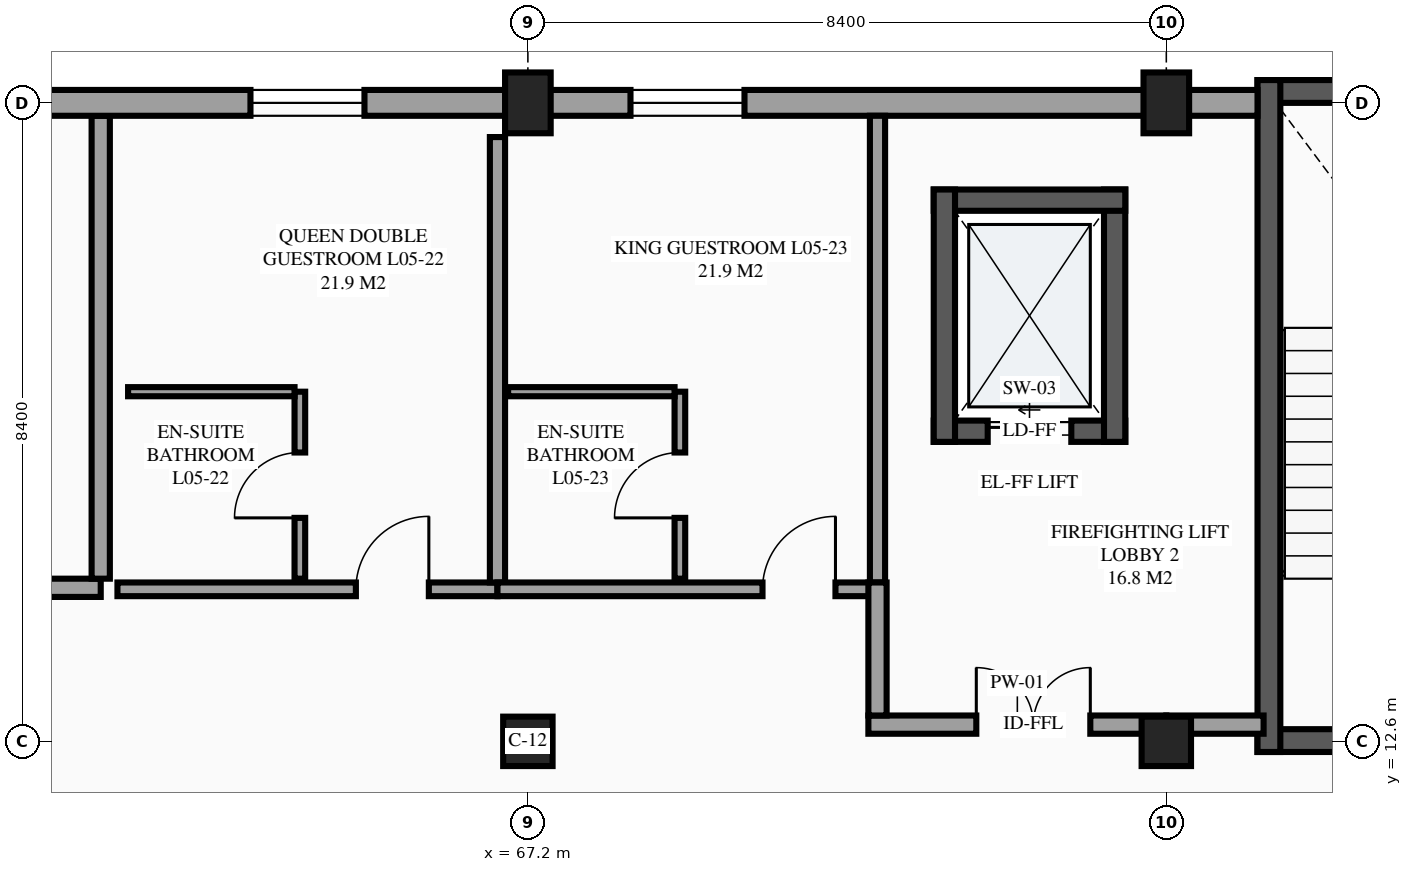
"""IFC4 building model, lengths in metres.
Left out: names, types, materials, properties, quantities, classifications, styles, units other than length and angle.
Written with IfcOpenShell. Run it as: python <this file> out.ifc"""

import sys

from ifc_helpers import new_model, si_unit, direction, frame, frame_2d, origin, origin_2d, place, context, subcontext, project, spatial, rectangle, extrude, element, fill, save


model = new_model("IFC4")
c1 = context("Model", 3, precision=1e-05, world=origin(), true_north=direction((0.0, 1.0)))
c2 = subcontext(c1, "Body", "Model", "MODEL_VIEW")
j1 = project(units=[si_unit("LENGTHUNIT", "METRE"), si_unit("PLANEANGLEUNIT", "RADIAN")], contexts=[c1])
p1 = place(None, origin())
s1 = spatial("IfcSite", under=j1, at=p1, CompositionType="ELEMENT")
p2 = place(p1, origin())
s2 = spatial("IfcBuilding", under=s1, at=p2, CompositionType="ELEMENT")
p3 = place(p2, frame((0.0, 0.0, 21.9)))
s3 = spatial("IfcBuildingStorey", under=s2, at=p3, CompositionType="ELEMENT", Elevation=21.9)
p4 = place(p3, frame((67.2, 12.6, 0.0), z_axis=(0.0, 0.0, 1.0), x_axis=(1.0, 0.0, 0.0)))
e1 = element("IfcColumn", 1, at=p4, inside=s3, PredefinedType="COLUMN", context=c2, shape_type="SweptSolid", body=[
    extrude(rectangle(XDim=0.65, YDim=0.65, at=origin_2d()), origin(), (0.0, 0.0, 1.0), 3.6),
])
p5 = place(p3, frame((67.2, 21.0, 0.0), z_axis=(0.0, 0.0, 1.0), x_axis=(1.0, 0.0, 0.0)))
e2 = element("IfcColumn", 2, at=p5, inside=s3, PredefinedType="COLUMN", context=c2, shape_type="SweptSolid", body=[
    extrude(rectangle(XDim=0.6, YDim=0.8, at=origin_2d()), origin(), (0.0, 0.0, 1.0), 3.6),
])
p6 = place(p3, frame((75.6, 12.6, 0.0), z_axis=(0.0, 0.0, 1.0), x_axis=(1.0, 0.0, 0.0)))
e3 = element("IfcColumn", 3, at=p6, inside=s3, PredefinedType="COLUMN", context=c2, shape_type="SweptSolid", body=[
    extrude(rectangle(XDim=0.65, YDim=0.65, at=origin_2d()), origin(), (0.0, 0.0, 1.0), 3.6),
])
p7 = place(p3, frame((75.6, 21.0, 0.0), z_axis=(0.0, 0.0, 1.0), x_axis=(1.0, 0.0, 0.0)))
e4 = element("IfcColumn", 4, at=p7, inside=s3, PredefinedType="COLUMN", context=c2, shape_type="SweptSolid", body=[
    extrude(rectangle(XDim=0.6, YDim=0.8, at=origin_2d()), origin(), (0.0, 0.0, 1.0), 3.6),
])
p8 = place(p3, frame((75.6, 21.0, 0.0), z_axis=(0.0, 0.0, 1.0), x_axis=(-1.0, 0.0, 0.0)))
e5 = element("IfcWall", 5, at=p8, inside=s3, PredefinedType="STANDARD", context=c2, shape_type="SweptSolid", body=[
    extrude(rectangle(XDim=8.4, YDim=0.34, at=frame_2d((4.2, 0.0))), origin(), (0.0, 0.0, 1.0), 2.68),
])
p9 = place(p8, frame((5.55, 0.0, 0.85)))
e6 = element("IfcOpeningElement", 6, at=p9, cuts=e5, PredefinedType="OPENING", context=c2, shape_type="SweptSolid", body=[
    extrude(rectangle(XDim=1.5, YDim=1.5, at=frame_2d((0.75, 0.75))), frame((0.0, 0.18, 0.0), z_axis=(0.0, -1.0, 0.0), x_axis=(1.0, 0.0, 0.0)), (0.0, 0.0, 1.0), 0.36),
])
p10 = place(p3, frame((72.54, 16.68, 0.0), z_axis=(0.0, 0.0, 1.0), x_axis=(1.0, 0.0, 0.0)))
e7 = element("IfcWall", 7, at=p10, inside=s3, PredefinedType="SHEAR", context=c2, shape_type="SweptSolid", body=[
    extrude(rectangle(XDim=2.52, YDim=0.28, at=frame_2d((1.26, 0.0))), origin(), (0.0, 0.0, 1.0), 3.6),
])
p11 = place(p10, frame((0.71, 0.0, 0.0)))
e8 = element("IfcOpeningElement", 8, at=p11, cuts=e7, PredefinedType="OPENING", context=c2, shape_type="SweptSolid", body=[
    extrude(rectangle(XDim=1.1, YDim=2.2, at=frame_2d((0.55, 1.1))), frame((0.0, 0.15, 0.0), z_axis=(0.0, -1.0, 0.0), x_axis=(1.0, 0.0, 0.0)), (0.0, 0.0, 1.0), 0.3),
])
p12 = place(p3, frame((74.92, 16.54, 0.0), z_axis=(0.0, 0.0, 1.0), x_axis=(0.0, 1.0, 0.0)))
e9 = element("IfcWall", 9, at=p12, inside=s3, PredefinedType="SHEAR", context=c2, shape_type="SweptSolid", body=[
    extrude(rectangle(XDim=3.32, YDim=0.28, at=frame_2d((1.66, 0.0))), origin(), (0.0, 0.0, 1.0), 3.6),
])
p13 = place(p3, frame((75.06, 19.72, 0.0), z_axis=(0.0, 0.0, 1.0), x_axis=(-1.0, 0.0, 0.0)))
e10 = element("IfcWall", 10, at=p13, inside=s3, PredefinedType="SHEAR", context=c2, shape_type="SweptSolid", body=[
    extrude(rectangle(XDim=2.52, YDim=0.28, at=frame_2d((1.26, 0.0))), origin(), (0.0, 0.0, 1.0), 3.6),
])
p14 = place(p3, frame((72.68, 19.86, 0.0), z_axis=(0.0, 0.0, 1.0), x_axis=(0.0, -1.0, 0.0)))
e11 = element("IfcWall", 11, at=p14, inside=s3, PredefinedType="SHEAR", context=c2, shape_type="SweptSolid", body=[
    extrude(rectangle(XDim=3.32, YDim=0.28, at=frame_2d((1.66, 0.0))), origin(), (0.0, 0.0, 1.0), 3.6),
])
p15 = place(p3, frame((76.8, 12.61, 0.0), z_axis=(0.0, 0.0, 1.0), x_axis=(1.0, 0.0, 0.0)))
e12 = element("IfcWall", 12, at=p15, inside=s3, PredefinedType="SHEAR", context=c2, shape_type="SweptSolid", body=[
    extrude(rectangle(XDim=5.2, YDim=0.3, at=frame_2d((2.6, 0.0))), origin(), (0.0, 0.0, 1.0), 3.6),
])
p16 = place(p15, frame((2.025, 0.0, 0.0)))
e13 = element("IfcOpeningElement", 13, at=p16, cuts=e12, PredefinedType="OPENING", context=c2, shape_type="SweptSolid", body=[
    extrude(rectangle(XDim=1.15, YDim=2.15, at=frame_2d((0.575, 1.075))), frame((0.0, 0.16, 0.0), z_axis=(0.0, -1.0, 0.0), x_axis=(1.0, 0.0, 0.0)), (0.0, 0.0, 1.0), 0.32),
])
p17 = place(p3, frame((82.0, 21.15, 0.0), z_axis=(0.0, 0.0, 1.0), x_axis=(-1.0, 0.0, 0.0)))
e14 = element("IfcWall", 14, at=p17, inside=s3, PredefinedType="SHEAR", context=c2, shape_type="SweptSolid", body=[
    extrude(rectangle(XDim=5.2, YDim=0.3, at=frame_2d((2.6, 0.0))), origin(), (0.0, 0.0, 1.0), 3.6),
])
p18 = place(p3, frame((76.95, 21.3, 0.0), z_axis=(0.0, 0.0, 1.0), x_axis=(0.0, -1.0, 0.0)))
e15 = element("IfcWall", 15, at=p18, inside=s3, PredefinedType="SHEAR", context=c2, shape_type="SweptSolid", body=[
    extrude(rectangle(XDim=8.84, YDim=0.3, at=frame_2d((4.42, 0.0))), origin(), (0.0, 0.0, 1.0), 3.6),
])
p19 = place(p3, frame((61.8, 14.6, 0.0), z_axis=(0.0, 0.0, 1.0), x_axis=(1.0, 0.0, 0.0)))
e16 = element("IfcWall", 16, at=p19, inside=s3, PredefinedType="PARTITIONING", context=c2, shape_type="SweptSolid", body=[
    extrude(rectangle(XDim=5.0, YDim=0.18, at=frame_2d((2.5, 0.0))), origin(), (0.0, 0.0, 1.0), 3.375),
])
p20 = place(p19, frame((3.137, 0.0, 0.0)))
e17 = element("IfcOpeningElement", 17, at=p20, cuts=e16, PredefinedType="OPENING", context=c2, shape_type="SweptSolid", body=[
    extrude(rectangle(XDim=0.96, YDim=2.15, at=frame_2d((0.48, 1.075))), frame((0.0, 0.1, 0.0), z_axis=(0.0, -1.0, 0.0), x_axis=(1.0, 0.0, 0.0)), (0.0, 0.0, 1.0), 0.2),
])
p21 = place(p3, frame((66.8, 14.69, 0.0), z_axis=(0.0, 0.0, 1.0), x_axis=(0.0, 1.0, 0.0)))
e18 = element("IfcWall", 18, at=p21, inside=s3, PredefinedType="PARTITIONING", context=c2, shape_type="SweptSolid", body=[
    extrude(rectangle(XDim=5.86, YDim=0.2, at=frame_2d((2.93, 0.0))), origin(), (0.0, 0.0, 1.0), 3.375),
])
p22 = place(p3, frame((64.2, 14.74, 0.0), z_axis=(0.0, 0.0, 1.0), x_axis=(0.0, 1.0, 0.0)))
e19 = element("IfcWall", 19, at=p22, inside=s3, PredefinedType="PARTITIONING", context=c2, shape_type="SweptSolid", body=[
    extrude(rectangle(XDim=2.46, YDim=0.14, at=frame_2d((1.23, 0.0))), origin(), (0.0, 0.0, 1.0), 3.375),
])
p23 = place(p22, frame((0.8, 0.0, 0.0)))
e20 = element("IfcOpeningElement", 20, at=p23, cuts=e19, PredefinedType="OPENING", context=c2, shape_type="SweptSolid", body=[
    extrude(rectangle(XDim=0.86, YDim=2.1, at=frame_2d((0.43, 1.05))), frame((0.0, 0.08, 0.0), z_axis=(0.0, -1.0, 0.0), x_axis=(1.0, 0.0, 0.0)), (0.0, 0.0, 1.0), 0.16),
])
p24 = place(p3, frame((61.94, 17.2, 0.0), z_axis=(0.0, 0.0, 1.0), x_axis=(1.0, 0.0, 0.0)))
e21 = element("IfcWall", 21, at=p24, inside=s3, PredefinedType="PARTITIONING", context=c2, shape_type="SweptSolid", body=[
    extrude(rectangle(XDim=2.19, YDim=0.12, at=frame_2d((1.095, 0.0))), origin(), (0.0, 0.0, 1.0), 3.375),
])
p25 = place(p3, frame((66.8, 14.6, 0.0), z_axis=(0.0, 0.0, 1.0), x_axis=(1.0, 0.0, 0.0)))
e22 = element("IfcWall", 22, at=p25, inside=s3, PredefinedType="PARTITIONING", context=c2, shape_type="SweptSolid", body=[
    extrude(rectangle(XDim=5.0, YDim=0.18, at=frame_2d((2.5, 0.0))), origin(), (0.0, 0.0, 1.0), 3.375),
])
p26 = place(p25, frame((3.487, 0.0, 0.0)))
e23 = element("IfcOpeningElement", 23, at=p26, cuts=e22, PredefinedType="OPENING", context=c2, shape_type="SweptSolid", body=[
    extrude(rectangle(XDim=0.96, YDim=2.15, at=frame_2d((0.48, 1.075))), frame((0.0, 0.1, 0.0), z_axis=(0.0, -1.0, 0.0), x_axis=(1.0, 0.0, 0.0)), (0.0, 0.0, 1.0), 0.2),
])
p27 = place(p3, frame((71.8, 14.69, 0.0), z_axis=(0.0, 0.0, 1.0), x_axis=(0.0, 1.0, 0.0)))
e24 = element("IfcWall", 24, at=p27, inside=s3, PredefinedType="PARTITIONING", context=c2, shape_type="SweptSolid", body=[
    extrude(rectangle(XDim=6.14, YDim=0.2, at=frame_2d((3.07, 0.0))), origin(), (0.0, 0.0, 1.0), 3.375),
])
p28 = place(p3, frame((69.2, 14.74, 0.0), z_axis=(0.0, 0.0, 1.0), x_axis=(0.0, 1.0, 0.0)))
e25 = element("IfcWall", 25, at=p28, inside=s3, PredefinedType="PARTITIONING", context=c2, shape_type="SweptSolid", body=[
    extrude(rectangle(XDim=2.46, YDim=0.14, at=frame_2d((1.23, 0.0))), origin(), (0.0, 0.0, 1.0), 3.375),
])
p29 = place(p28, frame((0.8, 0.0, 0.0)))
e26 = element("IfcOpeningElement", 26, at=p29, cuts=e25, PredefinedType="OPENING", context=c2, shape_type="SweptSolid", body=[
    extrude(rectangle(XDim=0.86, YDim=2.1, at=frame_2d((0.43, 1.05))), frame((0.0, 0.08, 0.0), z_axis=(0.0, -1.0, 0.0), x_axis=(1.0, 0.0, 0.0)), (0.0, 0.0, 1.0), 0.16),
])
p30 = place(p3, frame((66.94, 17.2, 0.0), z_axis=(0.0, 0.0, 1.0), x_axis=(1.0, 0.0, 0.0)))
e27 = element("IfcWall", 27, at=p30, inside=s3, PredefinedType="PARTITIONING", context=c2, shape_type="SweptSolid", body=[
    extrude(rectangle(XDim=2.19, YDim=0.12, at=frame_2d((1.095, 0.0))), origin(), (0.0, 0.0, 1.0), 3.375),
])
p31 = place(p3, frame((71.68, 12.82, 0.0), z_axis=(0.0, 0.0, 1.0), x_axis=(1.0, 0.0, 0.0)))
e28 = element("IfcWall", 28, at=p31, inside=s3, PredefinedType="PARTITIONING", context=c2, shape_type="SweptSolid", body=[
    extrude(rectangle(XDim=3.92, YDim=0.24, at=frame_2d((1.96, 0.0))), origin(), (0.0, 0.0, 1.0), 2.43),
])
p32 = place(p31, frame((1.42, 0.0, 0.0)))
e29 = element("IfcOpeningElement", 29, at=p32, cuts=e28, PredefinedType="OPENING", context=c2, shape_type="SweptSolid", body=[
    extrude(rectangle(XDim=1.5, YDim=2.15, at=frame_2d((0.75, 1.075))), frame((0.0, 0.13, 0.0), z_axis=(0.0, -1.0, 0.0), x_axis=(1.0, 0.0, 0.0)), (0.0, 0.0, 1.0), 0.26),
])
p33 = place(p3, frame((71.8, 12.94, 0.0), z_axis=(0.0, 0.0, 1.0), x_axis=(0.0, 1.0, 0.0)))
e30 = element("IfcWall", 30, at=p33, inside=s3, PredefinedType="PARTITIONING", context=c2, shape_type="SweptSolid", body=[
    extrude(rectangle(XDim=1.75, YDim=0.24, at=frame_2d((0.875, 0.0))), origin(), (0.0, 0.0, 1.0), 3.375),
])
p34 = place(p3, frame((51.02, 14.62, 0.0), z_axis=(0.0, 0.0, 1.0), x_axis=(1.0, 0.0, 0.0)))
e31 = element("IfcWall", 31, at=p34, inside=s3, PredefinedType="PARTITIONING", context=c2, shape_type="SweptSolid", body=[
    extrude(rectangle(XDim=10.56, YDim=0.24, at=frame_2d((5.28, 0.0))), origin(), (0.0, 0.0, 1.0), 3.375),
])
p35 = place(p34, frame((4.48, 0.0, 0.0)))
e32 = element("IfcOpeningElement", 32, at=p35, cuts=e31, PredefinedType="OPENING", context=c2, shape_type="SweptSolid", body=[
    extrude(rectangle(XDim=1.6, YDim=2.25, at=frame_2d((0.8, 1.125))), frame((0.0, 0.13, 0.0), z_axis=(0.0, -1.0, 0.0), x_axis=(1.0, 0.0, 0.0)), (0.0, 0.0, 1.0), 0.26),
])
p36 = place(p3, frame((61.58, 14.74, 0.0), z_axis=(0.0, 0.0, 1.0), x_axis=(0.0, 1.0, 0.0)))
e33 = element("IfcWall", 33, at=p36, inside=s3, PredefinedType="PARTITIONING", context=c2, shape_type="SweptSolid", body=[
    extrude(rectangle(XDim=6.09, YDim=0.24, at=frame_2d((3.045, 0.0))), origin(), (0.0, 0.0, 1.0), 3.375),
])
p37 = place(p3, frame((76.8, 21.0, 0.0), z_axis=(0.0, 0.0, 1.0), x_axis=(-1.0, 0.0, 0.0)))
e34 = element("IfcWall", 34, at=p37, inside=s3, PredefinedType="STANDARD", context=c2, shape_type="SweptSolid", body=[
    extrude(rectangle(XDim=1.2, YDim=0.34, at=frame_2d((0.6, 0.0))), origin(), (0.0, 0.0, 1.0), 2.78),
])
p38 = place(p3, frame((67.2, 21.0, 0.0), z_axis=(0.0, 0.0, 1.0), x_axis=(-1.0, 0.0, 0.0)))
e35 = element("IfcWall", 35, at=p38, inside=s3, PredefinedType="STANDARD", context=c2, shape_type="SweptSolid", body=[
    extrude(rectangle(XDim=8.4, YDim=0.34, at=frame_2d((4.2, 0.0))), origin(), (0.0, 0.0, 1.0), 3.133),
])
p39 = place(p38, frame((2.15, 0.0, 0.85)))
e36 = element("IfcOpeningElement", 36, at=p39, cuts=e35, PredefinedType="OPENING", context=c2, shape_type="SweptSolid", body=[
    extrude(rectangle(XDim=1.5, YDim=1.5, at=frame_2d((0.75, 0.75))), frame((0.0, 0.18, 0.0), z_axis=(0.0, -1.0, 0.0), x_axis=(1.0, 0.0, 0.0)), (0.0, 0.0, 1.0), 0.36),
])
p40 = place(p3, frame((75.6, 12.82, 0.0), z_axis=(0.0, 0.0, 1.0), x_axis=(1.0, 0.0, 0.0)))
e37 = element("IfcWall", 37, at=p40, inside=s3, PredefinedType="PARTITIONING", context=c2, shape_type="SweptSolid", body=[
    extrude(rectangle(XDim=1.28, YDim=0.24, at=frame_2d((0.64, 0.0))), origin(), (0.0, 0.0, 1.0), 2.53),
])
p41 = place(p39, origin())
e38 = element("IfcWindow", 38, at=p41, inside=s3, PartitioningType="SINGLE_PANEL", PredefinedType="WINDOW", context=c2, shape_type="SweptSolid", body=[
    extrude(rectangle(XDim=1.5, YDim=1.5, at=frame_2d((0.75, 0.75))), frame((0.0, 0.03, 0.0), z_axis=(0.0, -1.0, 0.0), x_axis=(1.0, 0.0, 0.0)), (0.0, 0.0, 1.0), 0.06),
])
fill(e36, e38)
p42 = place(p9, origin())
e39 = element("IfcWindow", 39, at=p42, inside=s3, PartitioningType="SINGLE_PANEL", PredefinedType="WINDOW", context=c2, shape_type="SweptSolid", body=[
    extrude(rectangle(XDim=1.5, YDim=1.5, at=frame_2d((0.75, 0.75))), frame((0.0, 0.03, 0.0), z_axis=(0.0, -1.0, 0.0), x_axis=(1.0, 0.0, 0.0)), (0.0, 0.0, 1.0), 0.06),
])
fill(e6, e39)
p43 = place(p11, origin())
e40 = element("IfcDoor", 40, at=p43, inside=s3, OperationType="SLIDING_TO_LEFT", PredefinedType="DOOR", context=c2, shape_type="SweptSolid", body=[
    extrude(rectangle(XDim=1.1, YDim=2.2, at=frame_2d((0.55, 1.1))), frame((0.0, 0.025, 0.0), z_axis=(0.0, -1.0, 0.0), x_axis=(1.0, 0.0, 0.0)), (0.0, 0.0, 1.0), 0.05),
])
fill(e8, e40)
p44 = place(p20, origin())
e41 = element("IfcDoor", 41, at=p44, inside=s3, OperationType="SINGLE_SWING_RIGHT", PredefinedType="DOOR", context=c2, shape_type="SweptSolid", body=[
    extrude(rectangle(XDim=0.96, YDim=2.15, at=frame_2d((0.48, 1.075))), frame((0.0, 0.025, 0.0), z_axis=(0.0, -1.0, 0.0), x_axis=(1.0, 0.0, 0.0)), (0.0, 0.0, 1.0), 0.05),
])
fill(e17, e41)
p45 = place(p23, origin())
e42 = element("IfcDoor", 42, at=p45, inside=s3, OperationType="SINGLE_SWING_LEFT", PredefinedType="DOOR", context=c2, shape_type="SweptSolid", body=[
    extrude(rectangle(XDim=0.86, YDim=2.1, at=frame_2d((0.43, 1.05))), frame((0.0, 0.025, 0.0), z_axis=(0.0, -1.0, 0.0), x_axis=(1.0, 0.0, 0.0)), (0.0, 0.0, 1.0), 0.05),
])
fill(e20, e42)
p46 = place(p26, origin())
e43 = element("IfcDoor", 43, at=p46, inside=s3, OperationType="SINGLE_SWING_RIGHT", PredefinedType="DOOR", context=c2, shape_type="SweptSolid", body=[
    extrude(rectangle(XDim=0.96, YDim=2.15, at=frame_2d((0.48, 1.075))), frame((0.0, 0.025, 0.0), z_axis=(0.0, -1.0, 0.0), x_axis=(1.0, 0.0, 0.0)), (0.0, 0.0, 1.0), 0.05),
])
fill(e23, e43)
p47 = place(p29, origin())
e44 = element("IfcDoor", 44, at=p47, inside=s3, OperationType="SINGLE_SWING_LEFT", PredefinedType="DOOR", context=c2, shape_type="SweptSolid", body=[
    extrude(rectangle(XDim=0.86, YDim=2.1, at=frame_2d((0.43, 1.05))), frame((0.0, 0.025, 0.0), z_axis=(0.0, -1.0, 0.0), x_axis=(1.0, 0.0, 0.0)), (0.0, 0.0, 1.0), 0.05),
])
fill(e26, e44)
p48 = place(p32, origin())
e45 = element("IfcDoor", 45, at=p48, inside=s3, OperationType="DOUBLE_DOOR_SINGLE_SWING", PredefinedType="DOOR", context=c2, shape_type="SweptSolid", body=[
    extrude(rectangle(XDim=1.5, YDim=2.15, at=frame_2d((0.75, 1.075))), frame((0.0, 0.025, 0.0), z_axis=(0.0, -1.0, 0.0), x_axis=(1.0, 0.0, 0.0)), (0.0, 0.0, 1.0), 0.05),
])
fill(e29, e45)
save(model, sys.argv[1])
